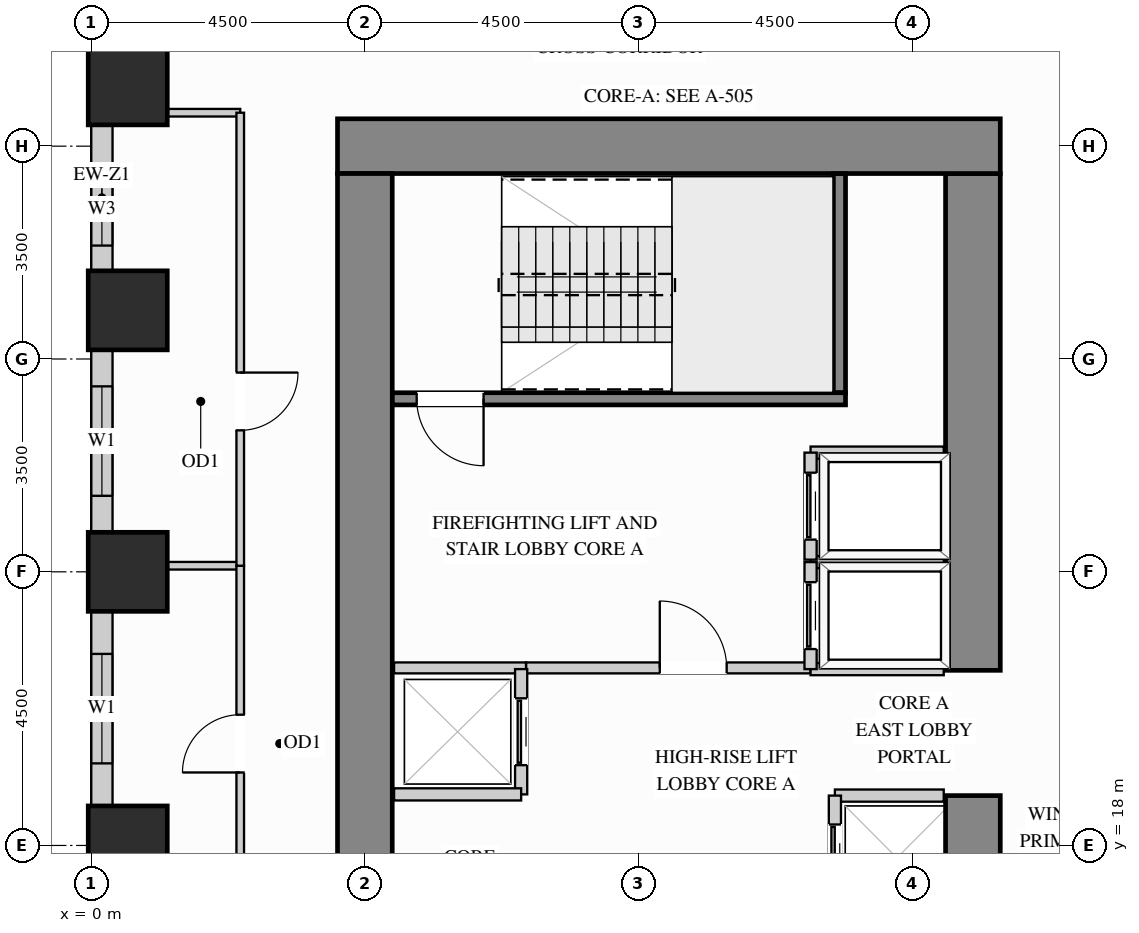
"""IFC4 building model, lengths in metres.
Left out: names, types, materials, properties, quantities, classifications, styles, units other than length and angle.
Written with IfcOpenShell. Run it as: python <this file> out.ifc"""

import sys

from ifc_helpers import new_model, si_unit, direction, frame, frame_2d, origin, origin_2d, place, context, subcontext, project, spatial, rectangle, extrude, source, transform, mapped, element, fill, save


model = new_model("IFC4")
c1 = context("Model", 3, precision=1e-05, world=origin(), true_north=direction((0.0, 1.0)))
c2 = subcontext(c1, "Body", "Model", "MODEL_VIEW")
j1 = project(units=[si_unit("LENGTHUNIT", "METRE"), si_unit("PLANEANGLEUNIT", "RADIAN")], contexts=[c1])
p1 = place(None, origin())
s1 = spatial("IfcSite", under=j1, at=p1, CompositionType="ELEMENT")
p2 = place(p1, origin())
s2 = spatial("IfcBuilding", under=s1, at=p2, CompositionType="ELEMENT")
p3 = place(p2, frame((0.0, 0.0, 26.1)))
s3 = spatial("IfcBuildingStorey", under=s2, at=p3, CompositionType="ELEMENT", Elevation=26.1)
m1 = source(origin(), c2, "Body", "SweptSolid", [
    extrude(rectangle(XDim=1.3, YDim=1.3, at=origin_2d()), origin(), (0.0, 0.0, 1.0), 3.38),
])
for number, where, z_axis, x_axis in (
    (1, (0.6, 18.0, 0.0), (0.0, 0.0, 1.0), (1.0, 0.0, 0.0)),
    (2, (0.6, 22.5, 0.0), (0.0, 0.0, 1.0), (1.0, 0.0, 0.0)),
    (3, (0.6, 26.8, 0.0), (0.0, 0.0, 1.0), (1.0, 0.0, 0.0)),
    (4, (0.6, 30.5, 0.0), (0.0, 0.0, 1.0), (1.0, 0.0, 0.0)),
):
    element("IfcColumn", number, at=place(p3, frame(where, z_axis=z_axis, x_axis=x_axis)), inside=s3, PredefinedType="COLUMN", context=c2, shape_type="MappedRepresentation", body=[
        mapped(m1, transform((0.0, 0.0, 0.0), x_axis=(1.0, 0.0, 0.0), y_axis=(0.0, 1.0, 0.0), z_axis=(0.0, 0.0, 1.0))),
    ])
m2 = source(origin(), c2, "Body", "SweptSolid", [
    extrude(rectangle(XDim=9.87, YDim=0.9, at=frame_2d((4.935, 0.0))), origin(), (0.0, 0.0, 1.0), 3.38),
])
p4 = place(p3, frame((14.5, 8.95, 0.0), z_axis=(0.0, 0.0, 1.0), x_axis=(0.0, 1.0, 0.0)))
e5 = element("IfcWall", 5, at=p4, inside=s3, PredefinedType="SHEAR", context=c2, shape_type="MappedRepresentation", body=[
    mapped(m2, transform((0.0, 0.0, 0.0), x_axis=(1.0, 0.0, 0.0), y_axis=(0.0, 1.0, 0.0), z_axis=(0.0, 0.0, 1.0))),
])
m3 = source(origin(), c2, "Body", "SweptSolid", [
    extrude(rectangle(XDim=8.17, YDim=0.9, at=frame_2d((4.085, 0.0))), origin(), (0.0, 0.0, 1.0), 3.38),
])
p5 = place(p3, frame((14.5, 20.88, 0.0), z_axis=(0.0, 0.0, 1.0), x_axis=(0.0, 1.0, 0.0)))
e6 = element("IfcWall", 6, at=p5, inside=s3, PredefinedType="SHEAR", context=c2, shape_type="MappedRepresentation", body=[
    mapped(m3, transform((0.0, 0.0, 0.0), x_axis=(1.0, 0.0, 0.0), y_axis=(0.0, 1.0, 0.0), z_axis=(0.0, 0.0, 1.0))),
])
m4 = source(origin(), c2, "Body", "SweptSolid", [
    extrude(rectangle(XDim=10.9, YDim=0.9, at=frame_2d((5.45, 0.0))), origin(), (0.0, 0.0, 1.0), 3.38),
])
p6 = place(p3, frame((4.05, 29.5, 0.0), z_axis=(0.0, 0.0, 1.0), x_axis=(1.0, 0.0, 0.0)))
e7 = element("IfcWall", 7, at=p6, inside=s3, PredefinedType="SHEAR", context=c2, shape_type="MappedRepresentation", body=[
    mapped(m4, transform((0.0, 0.0, 0.0), x_axis=(1.0, 0.0, 0.0), y_axis=(0.0, 1.0, 0.0), z_axis=(0.0, 0.0, 1.0))),
])
m5 = source(origin(), c2, "Body", "SweptSolid", [
    extrude(rectangle(XDim=20.1, YDim=0.9, at=frame_2d((10.05, 0.0))), origin(), (0.0, 0.0, 1.0), 3.38),
])
p7 = place(p3, frame((4.5, 8.95, 0.0), z_axis=(0.0, 0.0, 1.0), x_axis=(0.0, 1.0, 0.0)))
e8 = element("IfcWall", 8, at=p7, inside=s3, PredefinedType="SHEAR", context=c2, shape_type="MappedRepresentation", body=[
    mapped(m5, transform((0.0, 0.0, 0.0), x_axis=(1.0, 0.0, 0.0), y_axis=(0.0, 1.0, 0.0), z_axis=(0.0, 0.0, 1.0))),
])
p8 = place(p3, frame((0.175, 29.852, 0.0), z_axis=(0.0, 0.0, 1.0), x_axis=(0.0, -1.0, 0.0)))
e9 = element("IfcWall", 9, at=p8, inside=s3, PredefinedType="SOLIDWALL", context=c2, shape_type="SweptSolid", body=[
    extrude(rectangle(XDim=2.404, YDim=0.35, at=frame_2d((1.202, 0.0))), origin(), (0.0, 0.0, 1.0), 2.51),
])
p9 = place(p8, frame((0.787, 0.0, 0.78)))
e10 = element("IfcOpeningElement", 10, at=p9, cuts=e9, PredefinedType="OPENING", context=c2, shape_type="SweptSolid", body=[
    extrude(rectangle(XDim=1.2, YDim=1.55, at=frame_2d((0.6, 0.775))), frame((0.0, 0.185, 0.0), z_axis=(0.0, -1.0, 0.0), x_axis=(1.0, 0.0, 0.0)), (0.0, 0.0, 1.0), 0.37),
])
p10 = place(p3, frame((0.175, 26.152, 0.0), z_axis=(0.0, 0.0, 1.0), x_axis=(0.0, -1.0, 0.0)))
e11 = element("IfcWall", 11, at=p10, inside=s3, PredefinedType="SOLIDWALL", context=c2, shape_type="SweptSolid", body=[
    extrude(rectangle(XDim=3.004, YDim=0.35, at=frame_2d((1.502, 0.0))), origin(), (0.0, 0.0, 1.0), 2.51),
])
p11 = place(p10, frame((0.602, 0.0, 0.78)))
e12 = element("IfcOpeningElement", 12, at=p11, cuts=e11, PredefinedType="OPENING", context=c2, shape_type="SweptSolid", body=[
    extrude(rectangle(XDim=1.8, YDim=1.55, at=frame_2d((0.9, 0.775))), frame((0.0, 0.185, 0.0), z_axis=(0.0, -1.0, 0.0), x_axis=(1.0, 0.0, 0.0)), (0.0, 0.0, 1.0), 0.37),
])
p12 = place(p3, frame((0.175, 21.852, 0.0), z_axis=(0.0, 0.0, 1.0), x_axis=(0.0, -1.0, 0.0)))
e13 = element("IfcWall", 13, at=p12, inside=s3, PredefinedType="SOLIDWALL", context=c2, shape_type="SweptSolid", body=[
    extrude(rectangle(XDim=3.204, YDim=0.35, at=frame_2d((1.602, 0.0))), origin(), (0.0, 0.0, 1.0), 2.51),
])
p13 = place(p12, frame((0.702, 0.0, 0.78)))
e14 = element("IfcOpeningElement", 14, at=p13, cuts=e13, PredefinedType="OPENING", context=c2, shape_type="SweptSolid", body=[
    extrude(rectangle(XDim=1.8, YDim=1.55, at=frame_2d((0.9, 0.775))), frame((0.0, 0.185, 0.0), z_axis=(0.0, -1.0, 0.0), x_axis=(1.0, 0.0, 0.0)), (0.0, 0.0, 1.0), 0.37),
])
p14 = place(p3, frame((7.15, 20.92, 0.0), z_axis=(0.0, 0.0, 1.0), x_axis=(1.0, 0.0, 0.0)))
e15 = element("IfcWall", 15, at=p14, inside=s3, PredefinedType="PARTITIONING", context=c2, shape_type="SweptSolid", body=[
    extrude(rectangle(XDim=4.68, YDim=0.18, at=frame_2d((2.34, 0.0))), origin(), (0.0, 0.0, 1.0), 3.365),
])
p15 = place(p14, frame((2.2, 0.0, 0.0)))
e16 = element("IfcOpeningElement", 16, at=p15, cuts=e15, PredefinedType="OPENING", context=c2, shape_type="SweptSolid", body=[
    extrude(rectangle(XDim=1.1, YDim=2.15, at=frame_2d((0.55, 1.075))), frame((0.0, 0.1, 0.0), z_axis=(0.0, -1.0, 0.0), x_axis=(1.0, 0.0, 0.0)), (0.0, 0.0, 1.0), 0.2),
])
m6 = source(origin(), c2, "Body", "SweptSolid", [
    extrude(rectangle(XDim=2.17, YDim=0.18, at=frame_2d((1.085, 0.0))), origin(), (0.0, 0.0, 1.0), 3.365),
])
p16 = place(p3, frame((4.98, 20.92, 0.0), z_axis=(0.0, 0.0, 1.0), x_axis=(1.0, 0.0, 0.0)))
e17 = element("IfcWall", 17, at=p16, inside=s3, PredefinedType="PARTITIONING", context=c2, shape_type="MappedRepresentation", body=[
    mapped(m6, transform((0.0, 0.0, 0.0), x_axis=(1.0, 0.0, 0.0), y_axis=(0.0, 1.0, 0.0), z_axis=(0.0, 0.0, 1.0))),
])
m7 = source(origin(), c2, "Body", "SweptSolid", [
    extrude(rectangle(XDim=1.19, YDim=0.125, at=frame_2d((0.595, 0.0))), origin(), (0.0, 0.0, 1.0), 3.365),
])
for number, where, z_axis, x_axis in (
    (18, (1.26, 30.05, 0.0), (0.0, 0.0, 1.0), (1.0, 0.0, 0.0)),
    (19, (1.26, 22.6, 0.0), (0.0, 0.0, 1.0), (1.0, 0.0, 0.0)),
):
    element("IfcWall", number, at=place(p3, frame(where, z_axis=z_axis, x_axis=x_axis)), inside=s3, PredefinedType="PARTITIONING", context=c2, shape_type="MappedRepresentation", body=[
        mapped(m7, transform((0.0, 0.0, 0.0), x_axis=(1.0, 0.0, 0.0), y_axis=(0.0, 1.0, 0.0), z_axis=(0.0, 0.0, 1.0))),
    ])
p17 = place(p3, frame((2.45, 15.1, 0.0), z_axis=(0.0, 0.0, 1.0), x_axis=(0.0, 1.0, 0.0)))
e20 = element("IfcWall", 20, at=p17, inside=s3, PredefinedType="PARTITIONING", context=c2, shape_type="SweptSolid", body=[
    extrude(rectangle(XDim=7.5, YDim=0.125, at=frame_2d((3.75, 0.0))), origin(), (0.0, 0.0, 1.0), 3.365),
])
p18 = place(p17, frame((4.1, 0.0, 0.0)))
e21 = element("IfcOpeningElement", 21, at=p18, cuts=e20, PredefinedType="OPENING", context=c2, shape_type="SweptSolid", body=[
    extrude(rectangle(XDim=0.95, YDim=2.15, at=frame_2d((0.475, 1.075))), frame((0.0, 0.073, 0.0), z_axis=(0.0, -1.0, 0.0), x_axis=(1.0, 0.0, 0.0)), (0.0, 0.0, 1.0), 0.145),
])
p19 = place(p3, frame((2.45, 22.6, 0.0), z_axis=(0.0, 0.0, 1.0), x_axis=(0.0, 1.0, 0.0)))
e22 = element("IfcWall", 22, at=p19, inside=s3, PredefinedType="PARTITIONING", context=c2, shape_type="SweptSolid", body=[
    extrude(rectangle(XDim=7.45, YDim=0.125, at=frame_2d((3.725, 0.0))), origin(), (0.0, 0.0, 1.0), 3.365),
])
p20 = place(p19, frame((2.227, 0.0, 0.0)))
e23 = element("IfcOpeningElement", 23, at=p20, cuts=e22, PredefinedType="OPENING", context=c2, shape_type="SweptSolid", body=[
    extrude(rectangle(XDim=0.95, YDim=2.15, at=frame_2d((0.475, 1.075))), frame((0.0, 0.073, 0.0), z_axis=(0.0, -1.0, 0.0), x_axis=(1.0, 0.0, 0.0)), (0.0, 0.0, 1.0), 0.145),
])
m8 = source(origin(), c2, "Body", "SweptSolid", [
    extrude(rectangle(XDim=2.19, YDim=0.2, at=frame_2d((1.095, 0.0))), origin(), (0.0, 0.0, 1.0), 3.365),
])
for number, where, z_axis, x_axis in (
    (24, (11.83, 22.66, 0.0), (0.0, 0.0, 1.0), (1.0, 0.0, 0.0)),
    (25, (11.83, 20.9, 0.0), (0.0, 0.0, 1.0), (1.0, 0.0, 0.0)),
):
    element("IfcWall", number, at=place(p3, frame(where, z_axis=z_axis, x_axis=x_axis)), inside=s3, PredefinedType="PARTITIONING", context=c2, shape_type="MappedRepresentation", body=[
        mapped(m8, transform((0.0, 0.0, 0.0), x_axis=(1.0, 0.0, 0.0), y_axis=(0.0, 1.0, 0.0), z_axis=(0.0, 0.0, 1.0))),
    ])
p21 = place(p3, frame((11.83, 20.9, 0.0), z_axis=(0.0, 0.0, 1.0), x_axis=(0.0, 1.0, 0.0)))
e26 = element("IfcWall", 26, at=p21, inside=s3, PredefinedType="PARTITIONING", context=c2, shape_type="SweptSolid", body=[
    extrude(rectangle(XDim=1.76, YDim=0.2, at=frame_2d((0.88, 0.0))), origin(), (0.0, 0.0, 1.0), 3.365),
])
p22 = place(p21, frame((0.33, 0.0, 0.0)))
e27 = element("IfcOpeningElement", 27, at=p22, cuts=e26, PredefinedType="OPENING", context=c2, shape_type="SweptSolid", body=[
    extrude(rectangle(XDim=1.1, YDim=2.2, at=frame_2d((0.55, 1.1))), frame((0.0, 0.11, 0.0), z_axis=(0.0, -1.0, 0.0), x_axis=(1.0, 0.0, 0.0)), (0.0, 0.0, 1.0), 0.22),
])
p23 = place(p3, frame((11.83, 24.46, 0.0), z_axis=(0.0, 0.0, 1.0), x_axis=(1.0, 0.0, 0.0)))
e28 = element("IfcWall", 28, at=p23, inside=s3, PredefinedType="PARTITIONING", context=c2, shape_type="MappedRepresentation", body=[
    mapped(m8, transform((0.0, 0.0, 0.0), x_axis=(1.0, 0.0, 0.0), y_axis=(0.0, 1.0, 0.0), z_axis=(0.0, 0.0, 1.0))),
])
p24 = place(p3, frame((11.83, 22.7, 0.0), z_axis=(0.0, 0.0, 1.0), x_axis=(0.0, 1.0, 0.0)))
e29 = element("IfcWall", 29, at=p24, inside=s3, PredefinedType="PARTITIONING", context=c2, shape_type="SweptSolid", body=[
    extrude(rectangle(XDim=1.76, YDim=0.2, at=frame_2d((0.88, 0.0))), origin(), (0.0, 0.0, 1.0), 3.365),
])
p25 = place(p24, frame((0.33, 0.0, 0.0)))
e30 = element("IfcOpeningElement", 30, at=p25, cuts=e29, PredefinedType="OPENING", context=c2, shape_type="SweptSolid", body=[
    extrude(rectangle(XDim=1.1, YDim=2.2, at=frame_2d((0.55, 1.1))), frame((0.0, 0.11, 0.0), z_axis=(0.0, -1.0, 0.0), x_axis=(1.0, 0.0, 0.0)), (0.0, 0.0, 1.0), 0.22),
])
m9 = source(origin(), c2, "Body", "SweptSolid", [
    extrude(rectangle(XDim=1.79, YDim=0.2, at=frame_2d((0.895, 0.0))), origin(), (0.0, 0.0, 1.0), 3.365),
])
p26 = place(p3, frame((12.23, 18.82, 0.0), z_axis=(0.0, 0.0, 1.0), x_axis=(1.0, 0.0, 0.0)))
e31 = element("IfcWall", 31, at=p26, inside=s3, PredefinedType="PARTITIONING", context=c2, shape_type="MappedRepresentation", body=[
    mapped(m9, transform((0.0, 0.0, 0.0), x_axis=(1.0, 0.0, 0.0), y_axis=(0.0, 1.0, 0.0), z_axis=(0.0, 0.0, 1.0))),
])
p27 = place(p3, frame((12.23, 16.77, 0.0), z_axis=(0.0, 0.0, 1.0), x_axis=(0.0, 1.0, 0.0)))
e32 = element("IfcWall", 32, at=p27, inside=s3, PredefinedType="PARTITIONING", context=c2, shape_type="SweptSolid", body=[
    extrude(rectangle(XDim=2.05, YDim=0.2, at=frame_2d((1.025, 0.0))), origin(), (0.0, 0.0, 1.0), 3.365),
])
p28 = place(p27, frame((0.475, 0.0, 0.0)))
e33 = element("IfcOpeningElement", 33, at=p28, cuts=e32, PredefinedType="OPENING", context=c2, shape_type="SweptSolid", body=[
    extrude(rectangle(XDim=1.1, YDim=2.2, at=frame_2d((0.55, 1.1))), frame((0.0, 0.11, 0.0), z_axis=(0.0, -1.0, 0.0), x_axis=(1.0, 0.0, 0.0)), (0.0, 0.0, 1.0), 0.22),
])
p29 = place(p3, frame((7.07, 18.84, 0.0), z_axis=(0.0, 0.0, 1.0), x_axis=(0.0, 1.0, 0.0)))
e34 = element("IfcWall", 34, at=p29, inside=s3, PredefinedType="PARTITIONING", context=c2, shape_type="SweptSolid", body=[
    extrude(rectangle(XDim=2.06, YDim=0.2, at=frame_2d((1.03, 0.0))), origin(), (0.0, 0.0, 1.0), 3.365),
])
p30 = place(p29, frame((0.48, 0.0, 0.0)))
e35 = element("IfcOpeningElement", 35, at=p30, cuts=e34, PredefinedType="OPENING", context=c2, shape_type="SweptSolid", body=[
    extrude(rectangle(XDim=1.1, YDim=2.2, at=frame_2d((0.55, 1.1))), frame((0.0, 0.11, 0.0), z_axis=(0.0, -1.0, 0.0), x_axis=(1.0, 0.0, 0.0)), (0.0, 0.0, 1.0), 0.22),
])
m10 = source(origin(), c2, "Body", "SweptSolid", [
    extrude(rectangle(XDim=2.09, YDim=0.2, at=frame_2d((1.045, 0.0))), origin(), (0.0, 0.0, 1.0), 3.365),
])
p31 = place(p3, frame((4.98, 18.84, 0.0), z_axis=(0.0, 0.0, 1.0), x_axis=(1.0, 0.0, 0.0)))
e36 = element("IfcWall", 36, at=p31, inside=s3, PredefinedType="PARTITIONING", context=c2, shape_type="MappedRepresentation", body=[
    mapped(m10, transform((0.0, 0.0, 0.0), x_axis=(1.0, 0.0, 0.0), y_axis=(0.0, 1.0, 0.0), z_axis=(0.0, 0.0, 1.0))),
])
m11 = source(origin(), c2, "Body", "SweptSolid", [
    extrude(rectangle(XDim=3.603, YDim=0.2, at=frame_2d((1.802, 0.0))), origin(), (0.0, 0.0, 1.0), 3.38),
])
p32 = place(p3, frame((12.305, 25.445, 0.0), z_axis=(0.0, 0.0, 1.0), x_axis=(0.0, 1.0, 0.0)))
e37 = element("IfcWall", 37, at=p32, inside=s3, PredefinedType="SHEAR", context=c2, shape_type="MappedRepresentation", body=[
    mapped(m11, transform((0.0, 0.0, 0.0), x_axis=(1.0, 0.0, 0.0), y_axis=(0.0, 1.0, 0.0), z_axis=(0.0, 0.0, 1.0))),
])
p33 = place(p3, frame((4.952, 25.345, 0.0), z_axis=(0.0, 0.0, 1.0), x_axis=(1.0, 0.0, 0.0)))
e38 = element("IfcWall", 38, at=p33, inside=s3, PredefinedType="SHEAR", context=c2, shape_type="SweptSolid", body=[
    extrude(rectangle(XDim=7.453, YDim=0.2, at=frame_2d((3.727, 0.0))), origin(), (0.0, 0.0, 1.0), 3.38),
])
p34 = place(p33, frame((0.4, 0.0, 0.0)))
e39 = element("IfcOpeningElement", 39, at=p34, cuts=e38, PredefinedType="OPENING", context=c2, shape_type="SweptSolid", body=[
    extrude(rectangle(XDim=1.1, YDim=2.15, at=frame_2d((0.55, 1.075))), frame((0.0, 0.11, 0.0), z_axis=(0.0, -1.0, 0.0), x_axis=(1.0, 0.0, 0.0)), (0.0, 0.0, 1.0), 0.22),
])
m12 = source(origin(), c2, "Body", "SweptSolid", [
    extrude(rectangle(XDim=1.1, YDim=2.15, at=frame_2d((0.55, 1.075))), frame((0.0, 0.025, 0.0), z_axis=(0.0, -1.0, 0.0), x_axis=(1.0, 0.0, 0.0)), (0.0, 0.0, 1.0), 0.05),
])
p35 = place(p15, origin())
e40 = element("IfcDoor", 40, at=p35, inside=s3, OperationType="SINGLE_SWING_LEFT", PredefinedType="DOOR", context=c2, shape_type="MappedRepresentation", body=[
    mapped(m12, transform((0.0, 0.0, 0.0), x_axis=(1.0, 0.0, 0.0), y_axis=(0.0, 1.0, 0.0), z_axis=(0.0, 0.0, 1.0))),
])
fill(e16, e40)
m13 = source(origin(), c2, "Body", "SweptSolid", [
    extrude(rectangle(XDim=1.1, YDim=2.2, at=frame_2d((0.55, 1.1))), frame((0.0, 0.025, 0.0), z_axis=(0.0, -1.0, 0.0), x_axis=(1.0, 0.0, 0.0)), (0.0, 0.0, 1.0), 0.05),
])
p36 = place(p22, origin())
e41 = element("IfcDoor", 41, at=p36, inside=s3, OperationType="SLIDING_TO_LEFT", PredefinedType="DOOR", context=c2, shape_type="MappedRepresentation", body=[
    mapped(m13, transform((0.0, 0.0, 0.0), x_axis=(1.0, 0.0, 0.0), y_axis=(0.0, 1.0, 0.0), z_axis=(0.0, 0.0, 1.0))),
])
fill(e27, e41)
p37 = place(p25, origin())
e42 = element("IfcDoor", 42, at=p37, inside=s3, OperationType="SLIDING_TO_LEFT", PredefinedType="DOOR", context=c2, shape_type="MappedRepresentation", body=[
    mapped(m13, transform((0.0, 0.0, 0.0), x_axis=(1.0, 0.0, 0.0), y_axis=(0.0, 1.0, 0.0), z_axis=(0.0, 0.0, 1.0))),
])
fill(e30, e42)
p38 = place(p28, origin())
e43 = element("IfcDoor", 43, at=p38, inside=s3, OperationType="SLIDING_TO_LEFT", PredefinedType="DOOR", context=c2, shape_type="MappedRepresentation", body=[
    mapped(m13, transform((0.0, 0.0, 0.0), x_axis=(1.0, 0.0, 0.0), y_axis=(0.0, 1.0, 0.0), z_axis=(0.0, 0.0, 1.0))),
])
fill(e33, e43)
p39 = place(p30, origin())
e44 = element("IfcDoor", 44, at=p39, inside=s3, OperationType="SLIDING_TO_LEFT", PredefinedType="DOOR", context=c2, shape_type="MappedRepresentation", body=[
    mapped(m13, transform((0.0, 0.0, 0.0), x_axis=(1.0, 0.0, 0.0), y_axis=(0.0, 1.0, 0.0), z_axis=(0.0, 0.0, 1.0))),
])
fill(e35, e44)
m14 = source(origin(), c2, "Body", "SweptSolid", [
    extrude(rectangle(XDim=0.95, YDim=2.15, at=frame_2d((0.475, 1.075))), frame((0.0, 0.025, 0.0), z_axis=(0.0, -1.0, 0.0), x_axis=(1.0, 0.0, 0.0)), (0.0, 0.0, 1.0), 0.05),
])
p40 = place(p18, origin())
e45 = element("IfcDoor", 45, at=p40, inside=s3, OperationType="SINGLE_SWING_LEFT", PredefinedType="DOOR", context=c2, shape_type="MappedRepresentation", body=[
    mapped(m14, transform((0.0, 0.0, 0.0), x_axis=(1.0, 0.0, 0.0), y_axis=(0.0, 1.0, 0.0), z_axis=(0.0, 0.0, 1.0))),
])
fill(e21, e45)
p41 = place(p20, origin())
e46 = element("IfcDoor", 46, at=p41, inside=s3, OperationType="SINGLE_SWING_RIGHT", PredefinedType="DOOR", context=c2, shape_type="MappedRepresentation", body=[
    mapped(m14, transform((0.0, 0.0, 0.0), x_axis=(1.0, 0.0, 0.0), y_axis=(0.0, 1.0, 0.0), z_axis=(0.0, 0.0, 1.0))),
])
fill(e23, e46)
m15 = source(origin(), c2, "Body", "SweptSolid", [
    extrude(rectangle(XDim=1.1, YDim=2.15, at=frame_2d((0.55, 1.075))), frame((0.0, 0.025, 0.0), z_axis=(0.0, -1.0, 0.0), x_axis=(1.0, 0.0, 0.0)), (0.0, 0.0, 1.0), 0.05),
])
p42 = place(p34, origin())
e47 = element("IfcDoor", 47, at=p42, inside=s3, OperationType="SINGLE_SWING_RIGHT", PredefinedType="DOOR", context=c2, shape_type="MappedRepresentation", body=[
    mapped(m15, transform((0.0, 0.0, 0.0), x_axis=(1.0, 0.0, 0.0), y_axis=(0.0, 1.0, 0.0), z_axis=(0.0, 0.0, 1.0))),
])
fill(e39, e47)
m16 = source(origin(), c2, "Body", "SweptSolid", [
    extrude(rectangle(XDim=1.8, YDim=1.55, at=frame_2d((0.9, 0.775))), frame((0.0, 0.03, 0.0), z_axis=(0.0, -1.0, 0.0), x_axis=(1.0, 0.0, 0.0)), (0.0, 0.0, 1.0), 0.06),
])
p43 = place(p11, origin())
e48 = element("IfcWindow", 48, at=p43, inside=s3, PartitioningType="SINGLE_PANEL", PredefinedType="WINDOW", context=c2, shape_type="MappedRepresentation", body=[
    mapped(m16, transform((0.0, 0.0, 0.0), x_axis=(1.0, 0.0, 0.0), y_axis=(0.0, 1.0, 0.0), z_axis=(0.0, 0.0, 1.0))),
])
fill(e12, e48)
p44 = place(p13, origin())
e49 = element("IfcWindow", 49, at=p44, inside=s3, PartitioningType="SINGLE_PANEL", PredefinedType="WINDOW", context=c2, shape_type="MappedRepresentation", body=[
    mapped(m16, transform((0.0, 0.0, 0.0), x_axis=(1.0, 0.0, 0.0), y_axis=(0.0, 1.0, 0.0), z_axis=(0.0, 0.0, 1.0))),
])
fill(e14, e49)
m17 = source(origin(), c2, "Body", "SweptSolid", [
    extrude(rectangle(XDim=1.2, YDim=1.55, at=frame_2d((0.6, 0.775))), frame((0.0, 0.03, 0.0), z_axis=(0.0, -1.0, 0.0), x_axis=(1.0, 0.0, 0.0)), (0.0, 0.0, 1.0), 0.06),
])
p45 = place(p9, origin())
e50 = element("IfcWindow", 50, at=p45, inside=s3, PartitioningType="SINGLE_PANEL", PredefinedType="WINDOW", context=c2, shape_type="MappedRepresentation", body=[
    mapped(m17, transform((0.0, 0.0, 0.0), x_axis=(1.0, 0.0, 0.0), y_axis=(0.0, 1.0, 0.0), z_axis=(0.0, 0.0, 1.0))),
])
fill(e10, e50)
save(model, sys.argv[1])
